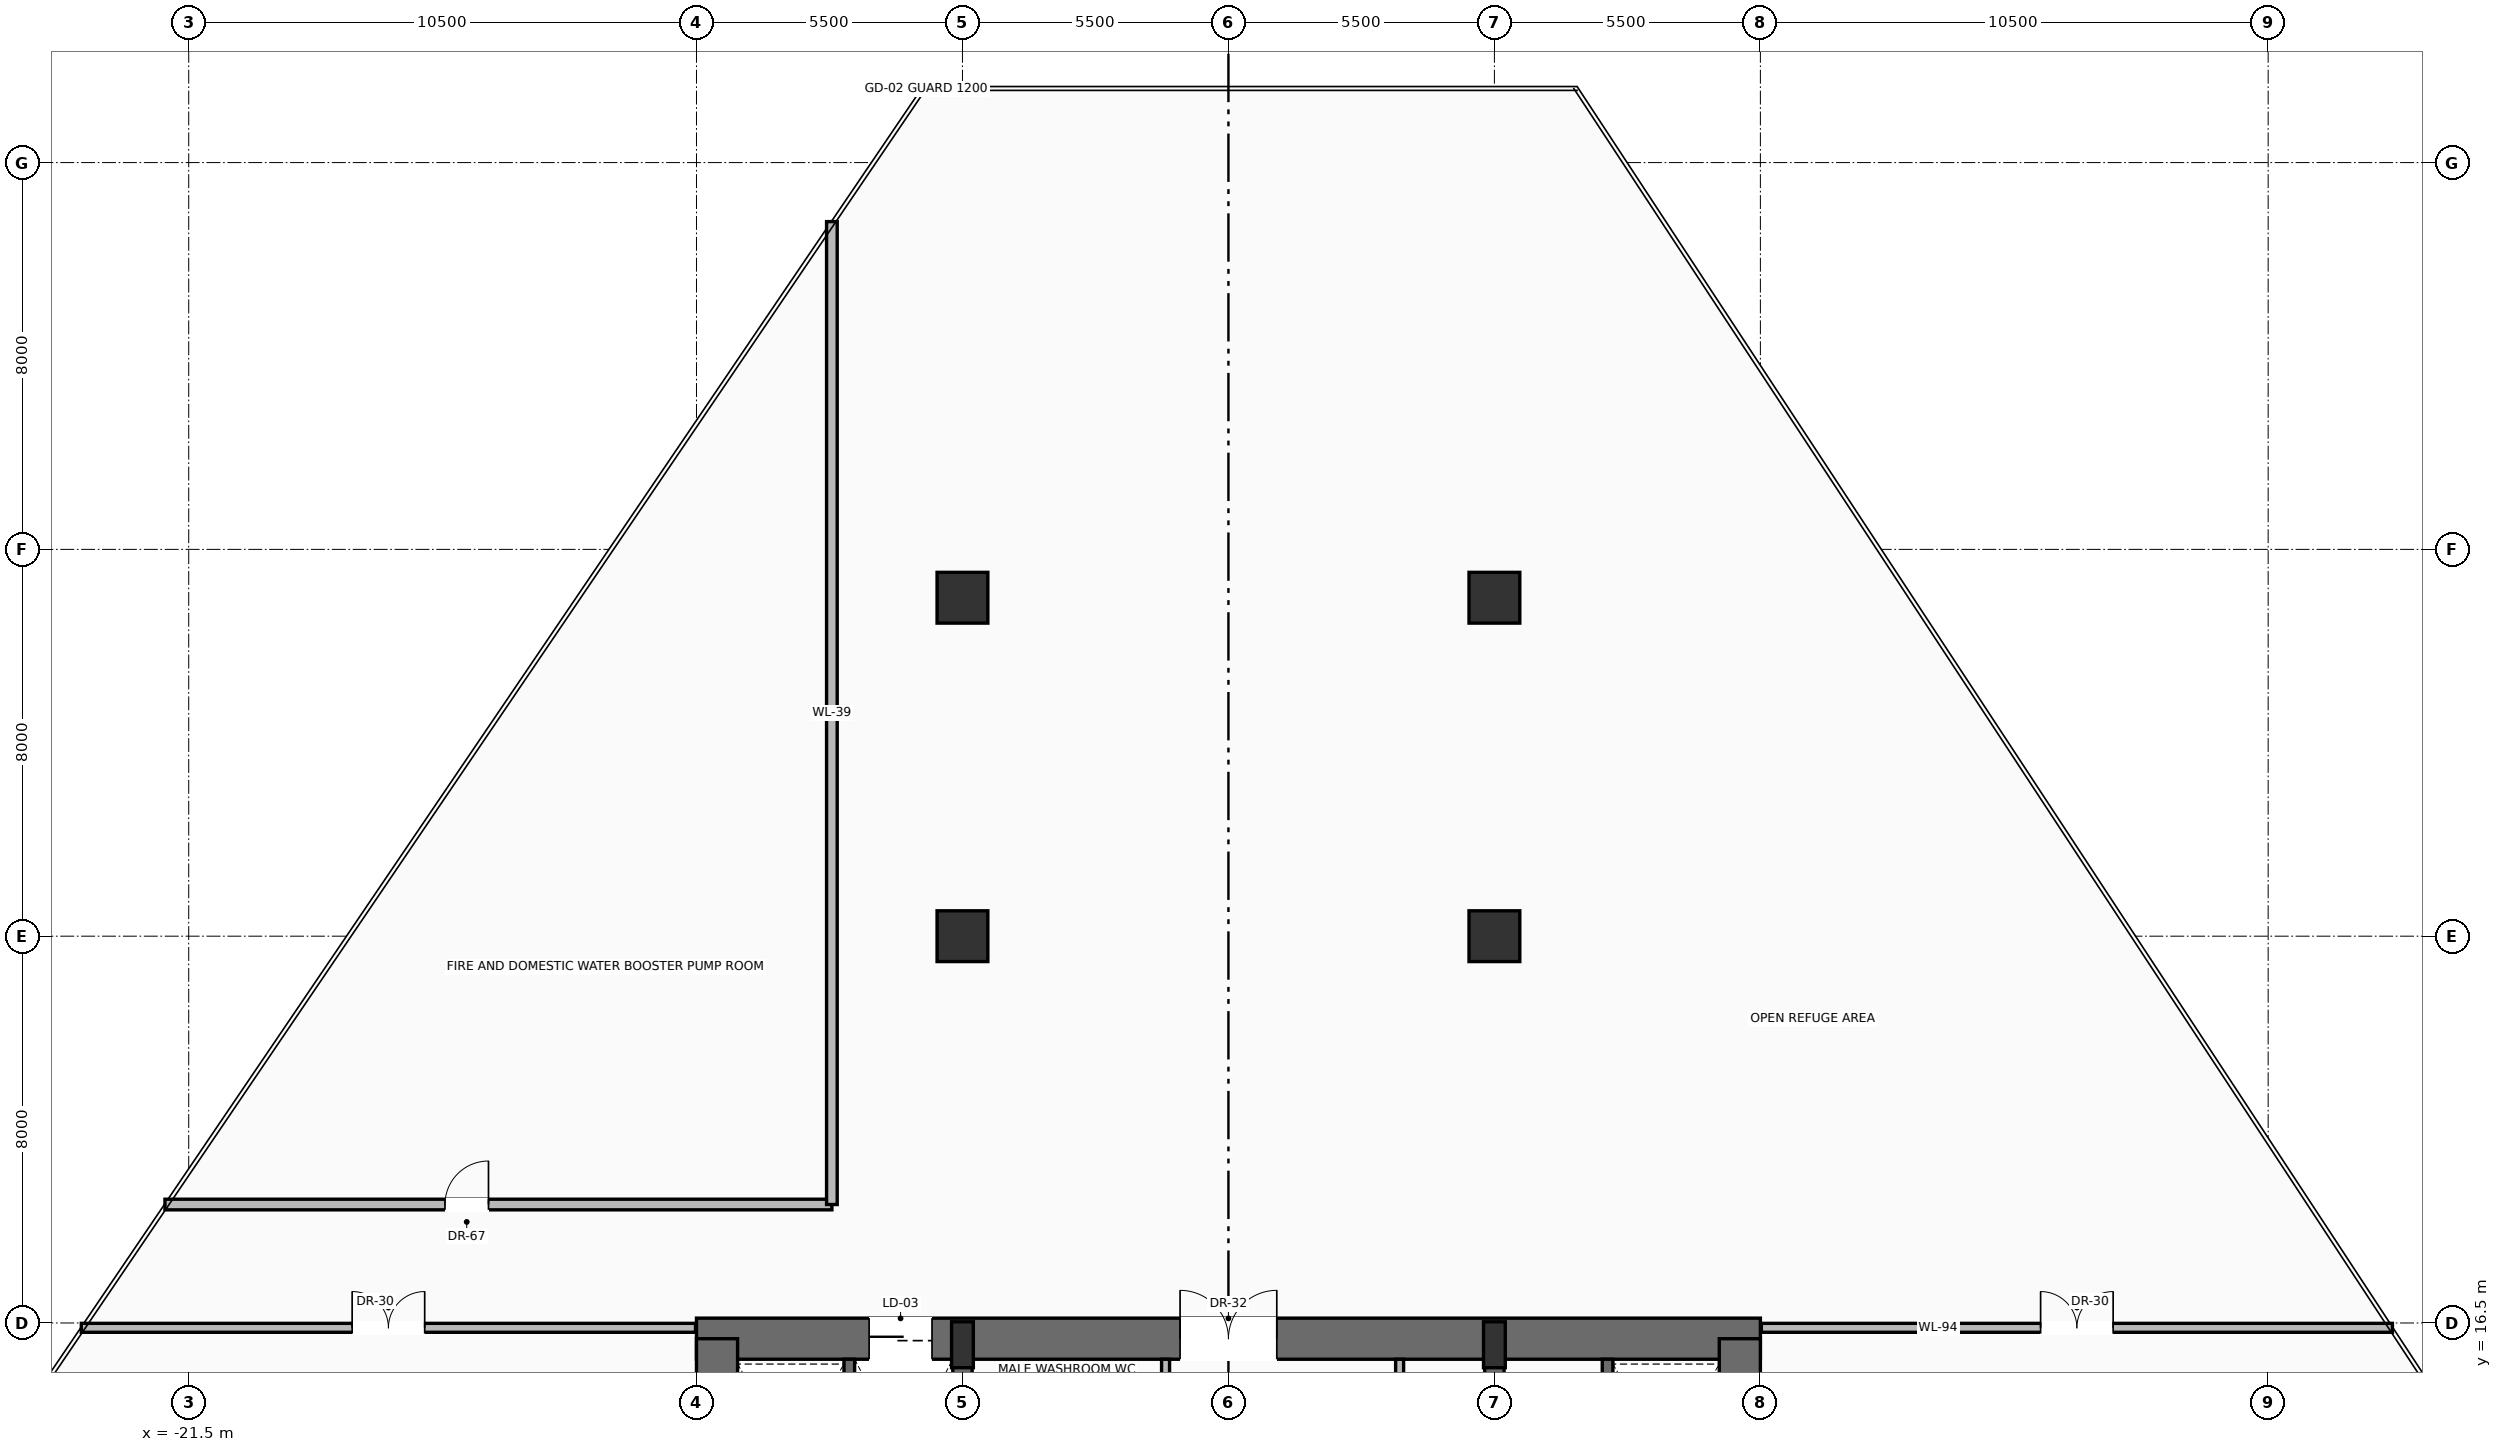
"""IFC4 building model, lengths in metres.
Left out: names, types, materials, properties, quantities, classifications, styles, units other than length and angle.
Written with IfcOpenShell. Run it as: python <this file> out.ifc"""

import sys

from ifc_helpers import new_model, si_unit, direction, frame, frame_2d, origin, origin_2d, place, context, subcontext, project, spatial, rectangle, extrude, source, transform, mapped, element, fill, save


model = new_model("IFC4")
c1 = context("Model", 3, precision=1e-05, world=origin(), true_north=direction((0.0, 1.0)))
c2 = subcontext(c1, "Body", "Model", "MODEL_VIEW")
j1 = project(units=[si_unit("LENGTHUNIT", "METRE"), si_unit("PLANEANGLEUNIT", "RADIAN")], contexts=[c1])
p1 = place(None, origin())
s1 = spatial("IfcSite", under=j1, at=p1, CompositionType="ELEMENT")
p2 = place(p1, origin())
s2 = spatial("IfcBuilding", under=s1, at=p2, CompositionType="ELEMENT")
p3 = place(p2, frame((0.0, 0.0, 71.9)))
s3 = spatial("IfcBuildingStorey", under=s2, at=p3, CompositionType="ELEMENT", Elevation=71.9)
p4 = place(p3, frame((-11.0, 16.175, 0.0), z_axis=(0.0, 0.0, 1.0), x_axis=(1.0, 0.0, 0.0)))
e1 = element("IfcWall", 1, at=p4, inside=s3, PredefinedType="SHEAR", context=c2, shape_type="SweptSolid", body=[
    extrude(rectangle(XDim=22.0, YDim=0.85, at=frame_2d((11.0, 0.0))), origin(), (0.0, 0.0, 1.0), 4.45),
])
p5 = place(p4, frame((3.57, 0.0, 0.0)))
e2 = element("IfcOpeningElement", 2, at=p5, cuts=e1, PredefinedType="OPENING", context=c2, shape_type="SweptSolid", body=[
    extrude(rectangle(XDim=1.3, YDim=2.3, at=frame_2d((0.65, 1.15))), frame((0.0, 0.435, 0.0), z_axis=(0.0, -1.0, 0.0), x_axis=(1.0, 0.0, 0.0)), (0.0, 0.0, 1.0), 0.87),
])
p6 = place(p4, frame((10.0, 0.0, 0.0)))
e3 = element("IfcOpeningElement", 3, at=p6, cuts=e1, PredefinedType="OPENING", context=c2, shape_type="SweptSolid", body=[
    extrude(rectangle(XDim=2.0, YDim=2.4, at=frame_2d((1.0, 1.2))), frame((0.0, 0.435, 0.0), z_axis=(0.0, -1.0, 0.0), x_axis=(1.0, 0.0, 0.0)), (0.0, 0.0, 1.0), 0.87),
])
for number, where, z_axis, x_axis in (
    (4, (-10.575, 0.425, 0.0), (0.0, 0.0, 1.0), (0.0, 1.0, 0.0)),
    (5, (10.575, 0.425, 0.0), (0.0, 0.0, 1.0), (0.0, 1.0, 0.0)),
):
    element("IfcWall", number, at=place(p3, frame(where, z_axis=z_axis, x_axis=x_axis)), inside=s3, PredefinedType="SHEAR", context=c2, shape_type="SweptSolid", body=[
        extrude(rectangle(XDim=15.75, YDim=0.85, at=frame_2d((7.875, 0.0))), origin(), (0.0, 0.0, 1.0), 4.45),
    ])
p7 = place(p3, frame((-5.5, 0.425, 0.0), z_axis=(0.0, 0.0, 1.0), x_axis=(0.0, 1.0, 0.0)))
e6 = element("IfcWall", 6, at=p7, inside=s3, PredefinedType="SHEAR", context=c2, shape_type="SweptSolid", body=[
    extrude(rectangle(XDim=15.75, YDim=0.4, at=frame_2d((7.875, 0.0))), origin(), (0.0, 0.0, 1.0), 4.45),
])
p8 = place(p7, frame((9.075, 0.0, 0.0)))
e7 = element("IfcOpeningElement", 7, at=p8, cuts=e6, PredefinedType="OPENING", context=c2, shape_type="SweptSolid", body=[
    extrude(rectangle(XDim=1.1, YDim=2.2, at=frame_2d((0.55, 1.1))), frame((0.0, 0.21, 0.0), z_axis=(0.0, -1.0, 0.0), x_axis=(1.0, 0.0, 0.0)), (0.0, 0.0, 1.0), 0.42),
])
p9 = place(p3, frame((5.5, 0.425, 0.0), z_axis=(0.0, 0.0, 1.0), x_axis=(0.0, 1.0, 0.0)))
e8 = element("IfcWall", 8, at=p9, inside=s3, PredefinedType="SHEAR", context=c2, shape_type="SweptSolid", body=[
    extrude(rectangle(XDim=15.75, YDim=0.4, at=frame_2d((7.875, 0.0))), origin(), (0.0, 0.0, 1.0), 4.45),
])
p10 = place(p9, frame((9.075, 0.0, 0.0)))
e9 = element("IfcOpeningElement", 9, at=p10, cuts=e8, PredefinedType="OPENING", context=c2, shape_type="SweptSolid", body=[
    extrude(rectangle(XDim=1.1, YDim=2.2, at=frame_2d((0.55, 1.1))), frame((0.0, 0.21, 0.0), z_axis=(0.0, -1.0, 0.0), x_axis=(1.0, 0.0, 0.0)), (0.0, 0.0, 1.0), 0.42),
])
m1 = source(origin(), c2, "Body", "SweptSolid", [
    extrude(rectangle(XDim=0.45, YDim=0.95, at=origin_2d()), origin(), (0.0, 0.0, 1.0), 4.7),
])
for number, where, z_axis, x_axis in (
    (10, (-5.5, 16.05, 0.0), (0.0, 0.0, 1.0), (1.0, 0.0, 0.0)),
    (11, (5.5, 16.05, 0.0), (0.0, 0.0, 1.0), (1.0, 0.0, 0.0)),
):
    element("IfcColumn", number, at=place(p3, frame(where, z_axis=z_axis, x_axis=x_axis)), inside=s3, PredefinedType="PILASTER", context=c2, shape_type="MappedRepresentation", body=[
        mapped(m1, transform((0.0, 0.0, 0.0), scale=1.0)),
    ])
m2 = source(origin(), c2, "Body", "SweptSolid", [
    extrude(rectangle(XDim=1.05, YDim=1.05, at=origin_2d()), origin(), (0.0, 0.0, 1.0), 4.7),
])
for number, where, z_axis, x_axis in (
    (12, (-5.5, 24.5, 0.0), (0.0, 0.0, 1.0), (1.0, 0.0, 0.0)),
    (13, (5.5, 24.5, 0.0), (0.0, 0.0, 1.0), (1.0, 0.0, 0.0)),
    (14, (-5.5, 31.5, 0.0), (0.0, 0.0, 1.0), (1.0, 0.0, 0.0)),
    (15, (5.5, 31.5, 0.0), (0.0, 0.0, 1.0), (1.0, 0.0, 0.0)),
):
    element("IfcColumn", number, at=place(p3, frame(where, z_axis=z_axis, x_axis=x_axis)), inside=s3, PredefinedType="COLUMN", context=c2, shape_type="MappedRepresentation", body=[
        mapped(m2, transform((0.0, 0.0, 0.0), scale=1.0)),
    ])
for number, where, z_axis, x_axis in (
    (16, (-7.84, 11.87, 0.0), (0.0, 0.0, 1.0), (0.0, 1.0, 0.0)),
    (17, (7.84, 11.87, 0.0), (0.0, 0.0, 1.0), (0.0, 1.0, 0.0)),
):
    element("IfcWall", number, at=place(p3, frame(where, z_axis=z_axis, x_axis=x_axis)), inside=s3, PredefinedType="SOLIDWALL", context=c2, shape_type="SweptSolid", body=[
        extrude(rectangle(XDim=3.88, YDim=0.22, at=frame_2d((1.94, 0.0))), origin(), (0.0, 0.0, 1.0), 4.45),
    ])
p11 = place(p3, frame((-1.3, 13.6, 0.0), z_axis=(0.0, 0.0, 1.0), x_axis=(0.0, 1.0, 0.0)))
e18 = element("IfcWall", 18, at=p11, inside=s3, PredefinedType="PARTITIONING", context=c2, shape_type="SweptSolid", body=[
    extrude(rectangle(XDim=2.15, YDim=0.165, at=frame_2d((1.075, 0.0))), origin(), (0.0, 0.0, 1.0), 4.442),
])
p12 = place(p11, frame((0.55, 0.0, 0.0)))
e19 = element("IfcOpeningElement", 19, at=p12, cuts=e18, PredefinedType="OPENING", context=c2, shape_type="SweptSolid", body=[
    extrude(rectangle(XDim=0.9, YDim=2.1, at=frame_2d((0.45, 1.05))), frame((0.0, 0.093, 0.0), z_axis=(0.0, -1.0, 0.0), x_axis=(1.0, 0.0, 0.0)), (0.0, 0.0, 1.0), 0.185),
])
p13 = place(p3, frame((3.54, 11.22, 0.0), z_axis=(0.0, 0.0, 1.0), x_axis=(0.0, 1.0, 0.0)))
e20 = element("IfcWall", 20, at=p13, inside=s3, PredefinedType="PARTITIONING", context=c2, shape_type="SweptSolid", body=[
    extrude(rectangle(XDim=4.53, YDim=0.165, at=frame_2d((2.265, 0.0))), origin(), (0.0, 0.0, 1.0), 4.442),
])
p14 = place(p13, frame((1.25, 0.0, 0.0)))
e21 = element("IfcOpeningElement", 21, at=p14, cuts=e20, PredefinedType="OPENING", context=c2, shape_type="SweptSolid", body=[
    extrude(rectangle(XDim=0.9, YDim=2.1, at=frame_2d((0.45, 1.05))), frame((0.0, 0.093, 0.0), z_axis=(0.0, -1.0, 0.0), x_axis=(1.0, 0.0, 0.0)), (0.0, 0.0, 1.0), 0.185),
])
p15 = place(p3, frame((-23.721, 16.4, 0.0), z_axis=(0.0, 0.0, 1.0), x_axis=(1.0, 0.0, 0.0)))
e22 = element("IfcWall", 22, at=p15, inside=s3, PredefinedType="PARTITIONING", context=c2, shape_type="SweptSolid", body=[
    extrude(rectangle(XDim=12.701, YDim=0.185, at=frame_2d((6.35, 0.0))), origin(), (0.0, 0.0, 1.0), 4.442),
])
p16 = place(p15, frame((5.6, 0.0, 0.0)))
e23 = element("IfcOpeningElement", 23, at=p16, cuts=e22, PredefinedType="OPENING", context=c2, shape_type="SweptSolid", body=[
    extrude(rectangle(XDim=1.5, YDim=2.25, at=frame_2d((0.75, 1.125))), frame((0.0, 0.103, 0.0), z_axis=(0.0, -1.0, 0.0), x_axis=(1.0, 0.0, 0.0)), (0.0, 0.0, 1.0), 0.205),
])
p17 = place(p3, frame((11.02, 16.4, 0.0), z_axis=(0.0, 0.0, 1.0), x_axis=(1.0, 0.0, 0.0)))
e24 = element("IfcWall", 24, at=p17, inside=s3, PredefinedType="PARTITIONING", context=c2, shape_type="SweptSolid", body=[
    extrude(rectangle(XDim=13.049, YDim=0.185, at=frame_2d((6.524, 0.0))), origin(), (0.0, 0.0, 1.0), 4.442),
])
p18 = place(p17, frame((5.775, 0.0, 0.0)))
e25 = element("IfcOpeningElement", 25, at=p18, cuts=e24, PredefinedType="OPENING", context=c2, shape_type="SweptSolid", body=[
    extrude(rectangle(XDim=1.5, YDim=2.25, at=frame_2d((0.75, 1.125))), frame((0.0, 0.103, 0.0), z_axis=(0.0, -1.0, 0.0), x_axis=(1.0, 0.0, 0.0)), (0.0, 0.0, 1.0), 0.205),
])
p19 = place(p3, frame((-21.991, 18.95, 0.0), z_axis=(0.0, 0.0, 1.0), x_axis=(1.0, 0.0, 0.0)))
e26 = element("IfcWall", 26, at=p19, inside=s3, PredefinedType="SOLIDWALL", context=c2, shape_type="SweptSolid", body=[
    extrude(rectangle(XDim=13.791, YDim=0.22, at=frame_2d((6.896, 0.0))), origin(), (0.0, 0.0, 1.0), 4.442),
])
p20 = place(p19, frame((5.79, 0.0, 0.0)))
e27 = element("IfcOpeningElement", 27, at=p20, cuts=e26, PredefinedType="OPENING", context=c2, shape_type="SweptSolid", body=[
    extrude(rectangle(XDim=0.9, YDim=2.1, at=frame_2d((0.45, 1.05))), frame((0.0, 0.12, 0.0), z_axis=(0.0, -1.0, 0.0), x_axis=(1.0, 0.0, 0.0)), (0.0, 0.0, 1.0), 0.24),
])
p21 = place(p3, frame((-8.2, 18.95, 0.0), z_axis=(0.0, 0.0, 1.0), x_axis=(0.0, 1.0, 0.0)))
e28 = element("IfcWall", 28, at=p21, inside=s3, PredefinedType="SOLIDWALL", context=c2, shape_type="SweptSolid", body=[
    extrude(rectangle(XDim=20.329, YDim=0.22, at=frame_2d((10.165, 0.0))), origin(), (0.0, 0.0, 1.0), 3.747),
])
m3 = source(origin(), c2, "Body", "SweptSolid", [
    extrude(rectangle(XDim=1.3, YDim=2.3, at=frame_2d((0.65, 1.15))), frame((0.0, 0.025, 0.0), z_axis=(0.0, -1.0, 0.0), x_axis=(1.0, 0.0, 0.0)), (0.0, 0.0, 1.0), 0.05),
])
p22 = place(p5, origin())
e29 = element("IfcDoor", 29, at=p22, inside=s3, OperationType="SLIDING_TO_RIGHT", PredefinedType="DOOR", context=c2, shape_type="MappedRepresentation", body=[
    mapped(m3, transform((0.0, 0.0, 0.0), scale=1.0)),
])
fill(e2, e29)
m4 = source(origin(), c2, "Body", "SweptSolid", [
    extrude(rectangle(XDim=2.0, YDim=2.4, at=frame_2d((1.0, 1.2))), frame((0.0, 0.025, 0.0), z_axis=(0.0, -1.0, 0.0), x_axis=(1.0, 0.0, 0.0)), (0.0, 0.0, 1.0), 0.05),
])
p23 = place(p6, origin())
e30 = element("IfcDoor", 30, at=p23, inside=s3, OperationType="DOUBLE_DOOR_SINGLE_SWING", PredefinedType="DOOR", context=c2, shape_type="MappedRepresentation", body=[
    mapped(m4, transform((0.0, 0.0, 0.0), scale=1.0)),
])
fill(e3, e30)
m5 = source(origin(), c2, "Body", "SweptSolid", [
    extrude(rectangle(XDim=1.5, YDim=2.25, at=frame_2d((0.75, 1.125))), frame((0.0, 0.025, 0.0), z_axis=(0.0, -1.0, 0.0), x_axis=(1.0, 0.0, 0.0)), (0.0, 0.0, 1.0), 0.05),
])
p24 = place(p16, origin())
e31 = element("IfcDoor", 31, at=p24, inside=s3, OperationType="DOUBLE_DOOR_SINGLE_SWING", PredefinedType="DOOR", context=c2, shape_type="MappedRepresentation", body=[
    mapped(m5, transform((0.0, 0.0, 0.0), scale=1.0)),
])
fill(e23, e31)
p25 = place(p18, origin())
e32 = element("IfcDoor", 32, at=p25, inside=s3, OperationType="DOUBLE_DOOR_SINGLE_SWING", PredefinedType="DOOR", context=c2, shape_type="MappedRepresentation", body=[
    mapped(m5, transform((0.0, 0.0, 0.0), scale=1.0)),
])
fill(e25, e32)
m6 = source(origin(), c2, "Body", "SweptSolid", [
    extrude(rectangle(XDim=0.9, YDim=2.1, at=frame_2d((0.45, 1.05))), frame((0.0, 0.025, 0.0), z_axis=(0.0, -1.0, 0.0), x_axis=(1.0, 0.0, 0.0)), (0.0, 0.0, 1.0), 0.05),
])
p26 = place(p20, origin())
e33 = element("IfcDoor", 33, at=p26, inside=s3, OperationType="SINGLE_SWING_RIGHT", PredefinedType="DOOR", context=c2, shape_type="MappedRepresentation", body=[
    mapped(m6, transform((0.0, 0.0, 0.0), scale=1.0)),
])
fill(e27, e33)
save(model, sys.argv[1])
